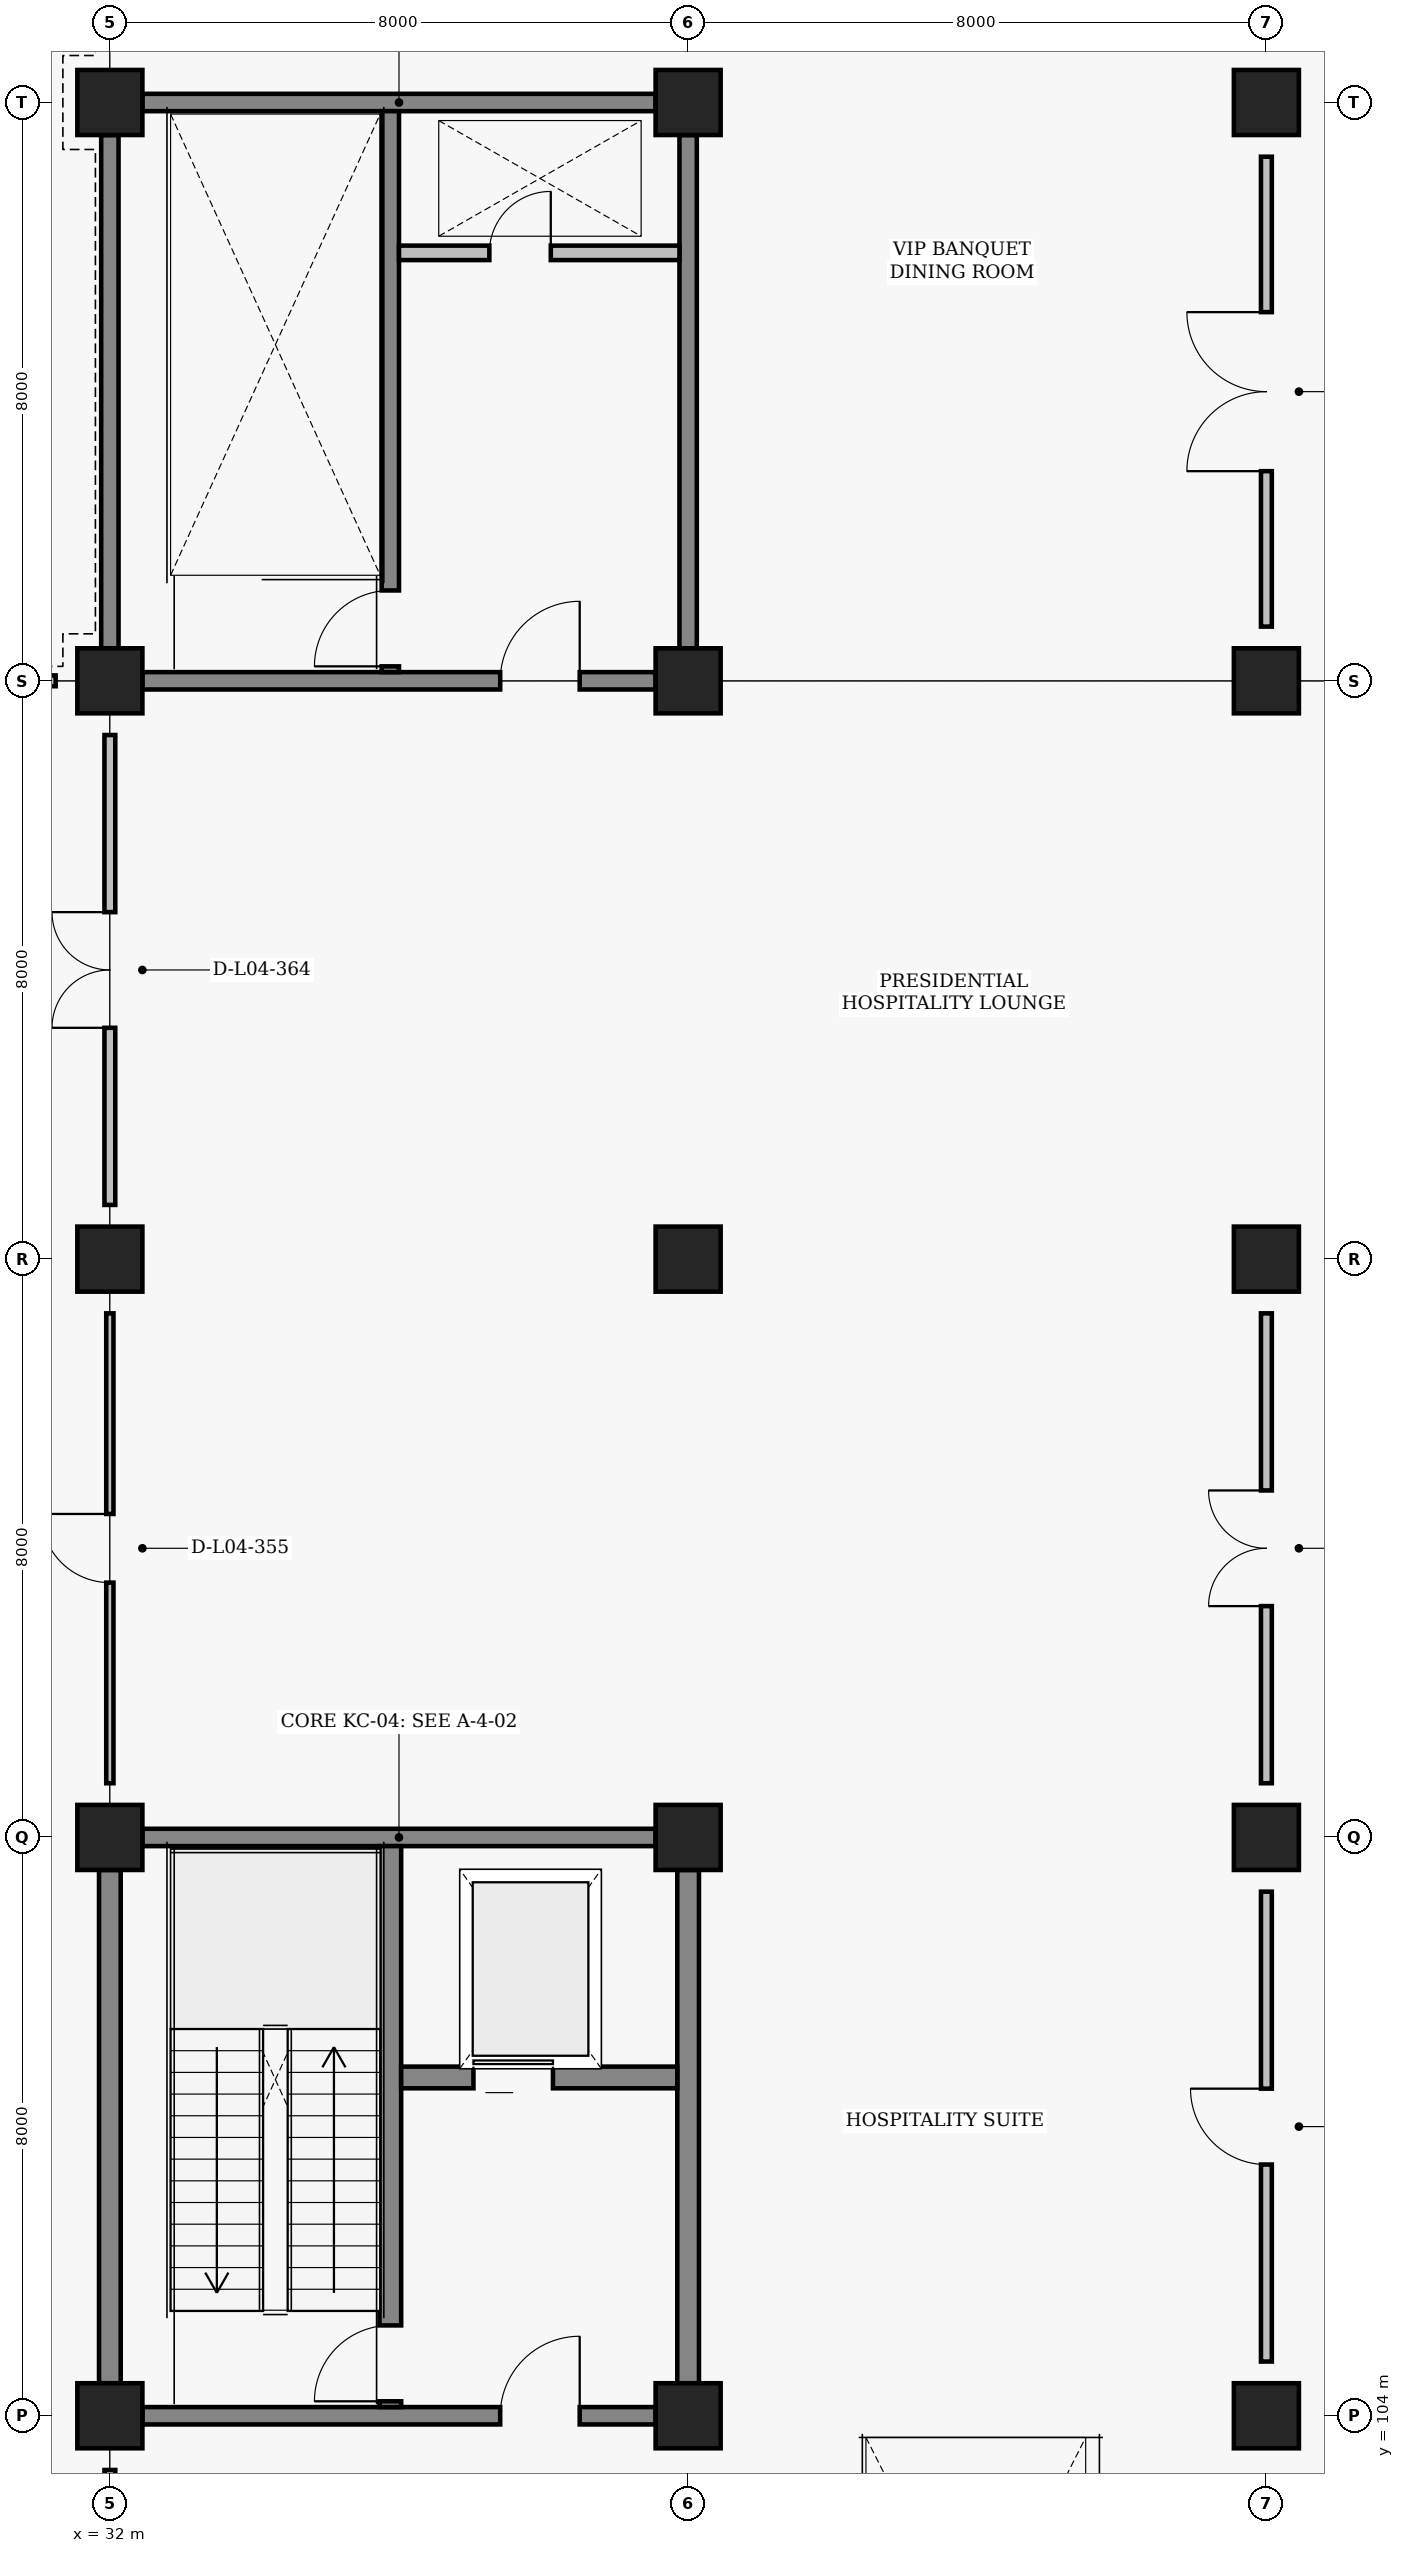
"""IFC4 building model, lengths in metres.
Left out: names, types, materials, properties, quantities, classifications, styles, units other than length and angle.
Written with IfcOpenShell. Run it as: python <this file> out.ifc"""

import sys

from ifc_helpers import new_model, si_unit, direction, frame, frame_2d, origin, origin_2d, place, context, subcontext, project, spatial, rectangle, extrude, element, fill, save


model = new_model("IFC4")
c1 = context("Model", 3, precision=1e-05, world=origin(), true_north=direction((0.0, 1.0)))
c2 = subcontext(c1, "Body", "Model", "MODEL_VIEW")
j1 = project(units=[si_unit("LENGTHUNIT", "METRE"), si_unit("PLANEANGLEUNIT", "RADIAN")], contexts=[c1])
p1 = place(None, origin())
s1 = spatial("IfcSite", under=j1, at=p1, CompositionType="ELEMENT")
p2 = place(p1, origin())
s2 = spatial("IfcBuilding", under=s1, at=p2, CompositionType="ELEMENT")
p3 = place(p2, frame((0.0, 0.0, 14.4)))
s3 = spatial("IfcBuildingStorey", under=s2, at=p3, CompositionType="ELEMENT", Elevation=14.4)
for number, where, z_axis, x_axis in (
    (1, (32.0, 104.0, 0.0), (0.0, 0.0, 1.0), (1.0, 0.0, 0.0)),
    (2, (32.0, 112.0, 0.0), (0.0, 0.0, 1.0), (1.0, 0.0, 0.0)),
    (3, (32.0, 120.0, 0.0), (0.0, 0.0, 1.0), (1.0, 0.0, 0.0)),
    (4, (32.0, 128.0, 0.0), (0.0, 0.0, 1.0), (1.0, 0.0, 0.0)),
    (5, (32.0, 136.0, 0.0), (0.0, 0.0, 1.0), (1.0, 0.0, 0.0)),
    (6, (40.0, 104.0, 0.0), (0.0, 0.0, 1.0), (1.0, 0.0, 0.0)),
    (7, (40.0, 112.0, 0.0), (0.0, 0.0, 1.0), (1.0, 0.0, 0.0)),
    (8, (40.0, 120.0, 0.0), (0.0, 0.0, 1.0), (1.0, 0.0, 0.0)),
    (9, (40.0, 128.0, 0.0), (0.0, 0.0, 1.0), (1.0, 0.0, 0.0)),
    (10, (40.0, 136.0, 0.0), (0.0, 0.0, 1.0), (1.0, 0.0, 0.0)),
    (11, (48.0, 104.0, 0.0), (0.0, 0.0, 1.0), (1.0, 0.0, 0.0)),
    (12, (48.0, 112.0, 0.0), (0.0, 0.0, 1.0), (1.0, 0.0, 0.0)),
    (13, (48.0, 120.0, 0.0), (0.0, 0.0, 1.0), (1.0, 0.0, 0.0)),
    (14, (48.0, 128.0, 0.0), (0.0, 0.0, 1.0), (1.0, 0.0, 0.0)),
    (15, (48.0, 136.0, 0.0), (0.0, 0.0, 1.0), (1.0, 0.0, 0.0)),
):
    element("IfcColumn", number, at=place(p3, frame(where, z_axis=z_axis, x_axis=x_axis)), inside=s3, PredefinedType="COLUMN", context=c2, shape_type="SweptSolid", body=[
        extrude(rectangle(XDim=0.9, YDim=0.9, at=origin_2d()), origin(), (0.0, 0.0, 1.0), 4.2),
    ])
p4 = place(p3, frame((32.45, 104.0, 0.0), z_axis=(0.0, 0.0, 1.0), x_axis=(1.0, 0.0, 0.0)))
e16 = element("IfcWall", 16, at=p4, inside=s3, PredefinedType="SHEAR", context=c2, shape_type="SweptSolid", body=[
    extrude(rectangle(XDim=7.1, YDim=0.24, at=frame_2d((3.55, 0.0))), origin(), (0.0, 0.0, 1.0), 3.33),
])
p5 = place(p4, frame((4.95, 0.0, 0.0)))
e17 = element("IfcOpeningElement", 17, at=p5, cuts=e16, PredefinedType="OPENING", context=c2, shape_type="SweptSolid", body=[
    extrude(rectangle(XDim=1.1, YDim=2.2, at=frame_2d((0.55, 1.1))), frame((0.0, 0.13, 0.0), z_axis=(0.0, -1.0, 0.0), x_axis=(1.0, 0.0, 0.0)), (0.0, 0.0, 1.0), 0.26),
])
p6 = place(p3, frame((32.45, 112.0, 0.0), z_axis=(0.0, 0.0, 1.0), x_axis=(1.0, 0.0, 0.0)))
e18 = element("IfcWall", 18, at=p6, inside=s3, PredefinedType="SHEAR", context=c2, shape_type="SweptSolid", body=[
    extrude(rectangle(XDim=7.1, YDim=0.24, at=frame_2d((3.55, 0.0))), origin(), (0.0, 0.0, 1.0), 3.33),
])
for number, where, z_axis, x_axis in (
    (19, (32.0, 104.45, 0.0), (0.0, 0.0, 1.0), (0.0, 1.0, 0.0)),
    (20, (40.0, 104.45, 0.0), (0.0, 0.0, 1.0), (0.0, 1.0, 0.0)),
):
    element("IfcWall", number, at=place(p3, frame(where, z_axis=z_axis, x_axis=x_axis)), inside=s3, PredefinedType="SHEAR", context=c2, shape_type="SweptSolid", body=[
        extrude(rectangle(XDim=7.1, YDim=0.3, at=frame_2d((3.55, 0.0))), origin(), (0.0, 0.0, 1.0), 3.33),
    ])
p7 = place(p3, frame((35.88, 104.12, 0.0), z_axis=(0.0, 0.0, 1.0), x_axis=(0.0, 1.0, 0.0)))
e21 = element("IfcWall", 21, at=p7, inside=s3, PredefinedType="SHEAR", context=c2, shape_type="SweptSolid", body=[
    extrude(rectangle(XDim=7.76, YDim=0.3, at=frame_2d((3.88, 0.0))), origin(), (0.0, 0.0, 1.0), 3.43),
])
p8 = place(p7, frame((0.08, 0.0, 0.0)))
e22 = element("IfcOpeningElement", 22, at=p8, cuts=e21, PredefinedType="OPENING", context=c2, shape_type="SweptSolid", body=[
    extrude(rectangle(XDim=1.05, YDim=2.15, at=frame_2d((0.525, 1.075))), frame((0.0, 0.16, 0.0), z_axis=(0.0, -1.0, 0.0), x_axis=(1.0, 0.0, 0.0)), (0.0, 0.0, 1.0), 0.32),
])
p9 = place(p3, frame((36.03, 108.68, 0.0), z_axis=(0.0, 0.0, 1.0), x_axis=(1.0, 0.0, 0.0)))
e23 = element("IfcWall", 23, at=p9, inside=s3, PredefinedType="SHEAR", context=c2, shape_type="SweptSolid", body=[
    extrude(rectangle(XDim=3.82, YDim=0.3, at=frame_2d((1.91, 0.0))), origin(), (0.0, 0.0, 1.0), 3.33),
])
p10 = place(p9, frame((1.0, 0.0, 0.0)))
e24 = element("IfcOpeningElement", 24, at=p10, cuts=e23, PredefinedType="OPENING", context=c2, shape_type="SweptSolid", body=[
    extrude(rectangle(XDim=1.1, YDim=2.15, at=frame_2d((0.55, 1.075))), frame((0.0, 0.16, 0.0), z_axis=(0.0, -1.0, 0.0), x_axis=(1.0, 0.0, 0.0)), (0.0, 0.0, 1.0), 0.32),
])
p11 = place(p3, frame((32.45, 128.0, 0.0), z_axis=(0.0, 0.0, 1.0), x_axis=(1.0, 0.0, 0.0)))
e25 = element("IfcWall", 25, at=p11, inside=s3, PredefinedType="SHEAR", context=c2, shape_type="SweptSolid", body=[
    extrude(rectangle(XDim=7.1, YDim=0.24, at=frame_2d((3.55, 0.0))), origin(), (0.0, 0.0, 1.0), 3.33),
])
p12 = place(p11, frame((4.95, 0.0, 0.0)))
e26 = element("IfcOpeningElement", 26, at=p12, cuts=e25, PredefinedType="OPENING", context=c2, shape_type="SweptSolid", body=[
    extrude(rectangle(XDim=1.1, YDim=2.2, at=frame_2d((0.55, 1.1))), frame((0.0, 0.13, 0.0), z_axis=(0.0, -1.0, 0.0), x_axis=(1.0, 0.0, 0.0)), (0.0, 0.0, 1.0), 0.26),
])
for number, where, z_axis, x_axis in (
    (27, (32.45, 136.0, 0.0), (0.0, 0.0, 1.0), (1.0, 0.0, 0.0)),
    (28, (32.0, 128.45, 0.0), (0.0, 0.0, 1.0), (0.0, 1.0, 0.0)),
    (29, (40.0, 128.45, 0.0), (0.0, 0.0, 1.0), (0.0, 1.0, 0.0)),
):
    element("IfcWall", number, at=place(p3, frame(where, z_axis=z_axis, x_axis=x_axis)), inside=s3, PredefinedType="SHEAR", context=c2, shape_type="SweptSolid", body=[
        extrude(rectangle(XDim=7.1, YDim=0.24, at=frame_2d((3.55, 0.0))), origin(), (0.0, 0.0, 1.0), 3.33),
    ])
p13 = place(p3, frame((35.88, 128.12, 0.0), z_axis=(0.0, 0.0, 1.0), x_axis=(0.0, 1.0, 0.0)))
e30 = element("IfcWall", 30, at=p13, inside=s3, PredefinedType="SHEAR", context=c2, shape_type="SweptSolid", body=[
    extrude(rectangle(XDim=7.76, YDim=0.24, at=frame_2d((3.88, 0.0))), origin(), (0.0, 0.0, 1.0), 3.43),
])
p14 = place(p13, frame((0.08, 0.0, 0.0)))
e31 = element("IfcOpeningElement", 31, at=p14, cuts=e30, PredefinedType="OPENING", context=c2, shape_type="SweptSolid", body=[
    extrude(rectangle(XDim=1.05, YDim=2.15, at=frame_2d((0.525, 1.075))), frame((0.0, 0.13, 0.0), z_axis=(0.0, -1.0, 0.0), x_axis=(1.0, 0.0, 0.0)), (0.0, 0.0, 1.0), 0.26),
])
p15 = place(p3, frame((36.0, 133.92, 0.0), z_axis=(0.0, 0.0, 1.0), x_axis=(1.0, 0.0, 0.0)))
e32 = element("IfcWall", 32, at=p15, inside=s3, PredefinedType="PARTITIONING", context=c2, shape_type="SweptSolid", body=[
    extrude(rectangle(XDim=3.88, YDim=0.2, at=frame_2d((1.94, 0.0))), origin(), (0.0, 0.0, 1.0), 3.33),
])
p16 = place(p15, frame((1.25, 0.0, 0.0)))
e33 = element("IfcOpeningElement", 33, at=p16, cuts=e32, PredefinedType="OPENING", context=c2, shape_type="SweptSolid", body=[
    extrude(rectangle(XDim=0.85, YDim=2.05, at=frame_2d((0.425, 1.025))), frame((0.0, 0.11, 0.0), z_axis=(0.0, -1.0, 0.0), x_axis=(1.0, 0.0, 0.0)), (0.0, 0.0, 1.0), 0.22),
])
p17 = place(p3, frame((32.0, 96.75, 0.0), z_axis=(0.0, 0.0, 1.0), x_axis=(0.0, 1.0, 0.0)))
e34 = element("IfcWall", 34, at=p17, inside=s3, PredefinedType="PARTITIONING", context=c2, shape_type="SweptSolid", body=[
    extrude(rectangle(XDim=6.5, YDim=0.15, at=frame_2d((3.25, 0.0))), origin(), (0.0, 0.0, 1.0), 3.33),
])
p18 = place(p17, frame((2.725, 0.0, 0.0)))
e35 = element("IfcOpeningElement", 35, at=p18, cuts=e34, PredefinedType="OPENING", context=c2, shape_type="SweptSolid", body=[
    extrude(rectangle(XDim=1.05, YDim=2.15, at=frame_2d((0.525, 1.075))), frame((0.0, 0.085, 0.0), z_axis=(0.0, -1.0, 0.0), x_axis=(1.0, 0.0, 0.0)), (0.0, 0.0, 1.0), 0.17),
])
p19 = place(p3, frame((32.0, 112.75, 0.0), z_axis=(0.0, 0.0, 1.0), x_axis=(0.0, 1.0, 0.0)))
e36 = element("IfcWall", 36, at=p19, inside=s3, PredefinedType="PARTITIONING", context=c2, shape_type="SweptSolid", body=[
    extrude(rectangle(XDim=6.5, YDim=0.1, at=frame_2d((3.25, 0.0))), origin(), (0.0, 0.0, 1.0), 3.33),
])
p20 = place(p19, frame((2.775, 0.0, 0.0)))
e37 = element("IfcOpeningElement", 37, at=p20, cuts=e36, PredefinedType="OPENING", context=c2, shape_type="SweptSolid", body=[
    extrude(rectangle(XDim=0.95, YDim=2.1, at=frame_2d((0.475, 1.05))), frame((0.0, 0.06, 0.0), z_axis=(0.0, -1.0, 0.0), x_axis=(1.0, 0.0, 0.0)), (0.0, 0.0, 1.0), 0.12),
])
p21 = place(p3, frame((24.75, 128.0, 0.0), z_axis=(0.0, 0.0, 1.0), x_axis=(1.0, 0.0, 0.0)))
e38 = element("IfcWall", 38, at=p21, inside=s3, PredefinedType="PARTITIONING", context=c2, shape_type="SweptSolid", body=[
    extrude(rectangle(XDim=6.5, YDim=0.15, at=frame_2d((3.25, 0.0))), origin(), (0.0, 0.0, 1.0), 3.43),
])
p22 = place(p21, frame((2.15, 0.0, 0.0)))
e39 = element("IfcOpeningElement", 39, at=p22, cuts=e38, PredefinedType="OPENING", context=c2, shape_type="SweptSolid", body=[
    extrude(rectangle(XDim=2.2, YDim=2.4, at=frame_2d((1.1, 1.2))), frame((0.0, 0.085, 0.0), z_axis=(0.0, -1.0, 0.0), x_axis=(1.0, 0.0, 0.0)), (0.0, 0.0, 1.0), 0.17),
])
p23 = place(p3, frame((48.0, 104.75, 0.0), z_axis=(0.0, 0.0, 1.0), x_axis=(0.0, 1.0, 0.0)))
e40 = element("IfcWall", 40, at=p23, inside=s3, PredefinedType="PARTITIONING", context=c2, shape_type="SweptSolid", body=[
    extrude(rectangle(XDim=6.5, YDim=0.15, at=frame_2d((3.25, 0.0))), origin(), (0.0, 0.0, 1.0), 3.33),
])
p24 = place(p23, frame((2.725, 0.0, 0.0)))
e41 = element("IfcOpeningElement", 41, at=p24, cuts=e40, PredefinedType="OPENING", context=c2, shape_type="SweptSolid", body=[
    extrude(rectangle(XDim=1.05, YDim=2.15, at=frame_2d((0.525, 1.075))), frame((0.0, 0.085, 0.0), z_axis=(0.0, -1.0, 0.0), x_axis=(1.0, 0.0, 0.0)), (0.0, 0.0, 1.0), 0.17),
])
p25 = place(p3, frame((32.0, 120.75, 0.0), z_axis=(0.0, 0.0, 1.0), x_axis=(0.0, 1.0, 0.0)))
e42 = element("IfcWall", 42, at=p25, inside=s3, PredefinedType="PARTITIONING", context=c2, shape_type="SweptSolid", body=[
    extrude(rectangle(XDim=6.5, YDim=0.15, at=frame_2d((3.25, 0.0))), origin(), (0.0, 0.0, 1.0), 3.33),
])
p26 = place(p25, frame((2.45, 0.0, 0.0)))
e43 = element("IfcOpeningElement", 43, at=p26, cuts=e42, PredefinedType="OPENING", context=c2, shape_type="SweptSolid", body=[
    extrude(rectangle(XDim=1.6, YDim=2.2, at=frame_2d((0.8, 1.1))), frame((0.0, 0.085, 0.0), z_axis=(0.0, -1.0, 0.0), x_axis=(1.0, 0.0, 0.0)), (0.0, 0.0, 1.0), 0.17),
])
p27 = place(p3, frame((48.0, 112.75, 0.0), z_axis=(0.0, 0.0, 1.0), x_axis=(0.0, 1.0, 0.0)))
e44 = element("IfcWall", 44, at=p27, inside=s3, PredefinedType="PARTITIONING", context=c2, shape_type="SweptSolid", body=[
    extrude(rectangle(XDim=6.5, YDim=0.15, at=frame_2d((3.25, 0.0))), origin(), (0.0, 0.0, 1.0), 3.33),
])
p28 = place(p27, frame((2.45, 0.0, 0.0)))
e45 = element("IfcOpeningElement", 45, at=p28, cuts=e44, PredefinedType="OPENING", context=c2, shape_type="SweptSolid", body=[
    extrude(rectangle(XDim=1.6, YDim=2.2, at=frame_2d((0.8, 1.1))), frame((0.0, 0.085, 0.0), z_axis=(0.0, -1.0, 0.0), x_axis=(1.0, 0.0, 0.0)), (0.0, 0.0, 1.0), 0.17),
])
p29 = place(p3, frame((48.0, 128.75, 0.0), z_axis=(0.0, 0.0, 1.0), x_axis=(0.0, 1.0, 0.0)))
e46 = element("IfcWall", 46, at=p29, inside=s3, PredefinedType="PARTITIONING", context=c2, shape_type="SweptSolid", body=[
    extrude(rectangle(XDim=6.5, YDim=0.15, at=frame_2d((3.25, 0.0))), origin(), (0.0, 0.0, 1.0), 3.33),
])
p30 = place(p29, frame((2.15, 0.0, 0.0)))
e47 = element("IfcOpeningElement", 47, at=p30, cuts=e46, PredefinedType="OPENING", context=c2, shape_type="SweptSolid", body=[
    extrude(rectangle(XDim=2.2, YDim=2.4, at=frame_2d((1.1, 1.2))), frame((0.0, 0.085, 0.0), z_axis=(0.0, -1.0, 0.0), x_axis=(1.0, 0.0, 0.0)), (0.0, 0.0, 1.0), 0.17),
])
p31 = place(p5, origin())
e48 = element("IfcDoor", 48, at=p31, inside=s3, OperationType="SINGLE_SWING_RIGHT", PredefinedType="DOOR", context=c2, shape_type="SweptSolid", body=[
    extrude(rectangle(XDim=1.1, YDim=2.2, at=frame_2d((0.55, 1.1))), frame((0.0, 0.025, 0.0), z_axis=(0.0, -1.0, 0.0), x_axis=(1.0, 0.0, 0.0)), (0.0, 0.0, 1.0), 0.05),
])
fill(e17, e48)
p32 = place(p8, origin())
e49 = element("IfcDoor", 49, at=p32, inside=s3, OperationType="SINGLE_SWING_LEFT", PredefinedType="DOOR", context=c2, shape_type="SweptSolid", body=[
    extrude(rectangle(XDim=1.05, YDim=2.15, at=frame_2d((0.525, 1.075))), frame((0.0, 0.025, 0.0), z_axis=(0.0, -1.0, 0.0), x_axis=(1.0, 0.0, 0.0)), (0.0, 0.0, 1.0), 0.05),
])
fill(e22, e49)
p33 = place(p10, origin())
e50 = element("IfcDoor", 50, at=p33, inside=s3, OperationType="SLIDING_TO_LEFT", PredefinedType="DOOR", context=c2, shape_type="SweptSolid", body=[
    extrude(rectangle(XDim=1.1, YDim=2.15, at=frame_2d((0.55, 1.075))), frame((0.0, 0.025, 0.0), z_axis=(0.0, -1.0, 0.0), x_axis=(1.0, 0.0, 0.0)), (0.0, 0.0, 1.0), 0.05),
])
fill(e24, e50)
p34 = place(p12, origin())
e51 = element("IfcDoor", 51, at=p34, inside=s3, OperationType="SINGLE_SWING_RIGHT", PredefinedType="DOOR", context=c2, shape_type="SweptSolid", body=[
    extrude(rectangle(XDim=1.1, YDim=2.2, at=frame_2d((0.55, 1.1))), frame((0.0, 0.025, 0.0), z_axis=(0.0, -1.0, 0.0), x_axis=(1.0, 0.0, 0.0)), (0.0, 0.0, 1.0), 0.05),
])
fill(e26, e51)
p35 = place(p14, origin())
e52 = element("IfcDoor", 52, at=p35, inside=s3, OperationType="SINGLE_SWING_LEFT", PredefinedType="DOOR", context=c2, shape_type="SweptSolid", body=[
    extrude(rectangle(XDim=1.05, YDim=2.15, at=frame_2d((0.525, 1.075))), frame((0.0, 0.025, 0.0), z_axis=(0.0, -1.0, 0.0), x_axis=(1.0, 0.0, 0.0)), (0.0, 0.0, 1.0), 0.05),
])
fill(e31, e52)
p36 = place(p16, origin())
e53 = element("IfcDoor", 53, at=p36, inside=s3, OperationType="SINGLE_SWING_RIGHT", PredefinedType="TRAPDOOR", context=c2, shape_type="SweptSolid", body=[
    extrude(rectangle(XDim=0.85, YDim=2.05, at=frame_2d((0.425, 1.025))), frame((0.0, 0.025, 0.0), z_axis=(0.0, -1.0, 0.0), x_axis=(1.0, 0.0, 0.0)), (0.0, 0.0, 1.0), 0.05),
])
fill(e33, e53)
p37 = place(p20, origin())
e54 = element("IfcDoor", 54, at=p37, inside=s3, OperationType="SINGLE_SWING_RIGHT", PredefinedType="DOOR", context=c2, shape_type="SweptSolid", body=[
    extrude(rectangle(XDim=0.95, YDim=2.1, at=frame_2d((0.475, 1.05))), frame((0.0, 0.025, 0.0), z_axis=(0.0, -1.0, 0.0), x_axis=(1.0, 0.0, 0.0)), (0.0, 0.0, 1.0), 0.05),
])
fill(e37, e54)
p38 = place(p24, origin())
e55 = element("IfcDoor", 55, at=p38, inside=s3, OperationType="SINGLE_SWING_RIGHT", PredefinedType="DOOR", context=c2, shape_type="SweptSolid", body=[
    extrude(rectangle(XDim=1.05, YDim=2.15, at=frame_2d((0.525, 1.075))), frame((0.0, 0.025, 0.0), z_axis=(0.0, -1.0, 0.0), x_axis=(1.0, 0.0, 0.0)), (0.0, 0.0, 1.0), 0.05),
])
fill(e41, e55)
p39 = place(p26, origin())
e56 = element("IfcDoor", 56, at=p39, inside=s3, OperationType="DOUBLE_SWING_LEFT", PredefinedType="DOOR", context=c2, shape_type="SweptSolid", body=[
    extrude(rectangle(XDim=1.6, YDim=2.2, at=frame_2d((0.8, 1.1))), frame((0.0, 0.025, 0.0), z_axis=(0.0, -1.0, 0.0), x_axis=(1.0, 0.0, 0.0)), (0.0, 0.0, 1.0), 0.05),
])
fill(e43, e56)
p40 = place(p28, origin())
e57 = element("IfcDoor", 57, at=p40, inside=s3, OperationType="DOUBLE_SWING_LEFT", PredefinedType="DOOR", context=c2, shape_type="SweptSolid", body=[
    extrude(rectangle(XDim=1.6, YDim=2.2, at=frame_2d((0.8, 1.1))), frame((0.0, 0.025, 0.0), z_axis=(0.0, -1.0, 0.0), x_axis=(1.0, 0.0, 0.0)), (0.0, 0.0, 1.0), 0.05),
])
fill(e45, e57)
p41 = place(p30, origin())
e58 = element("IfcDoor", 58, at=p41, inside=s3, OperationType="DOUBLE_SWING_LEFT", PredefinedType="DOOR", context=c2, shape_type="SweptSolid", body=[
    extrude(rectangle(XDim=2.2, YDim=2.4, at=frame_2d((1.1, 1.2))), frame((0.0, 0.025, 0.0), z_axis=(0.0, -1.0, 0.0), x_axis=(1.0, 0.0, 0.0)), (0.0, 0.0, 1.0), 0.05),
])
fill(e47, e58)
save(model, sys.argv[1])
